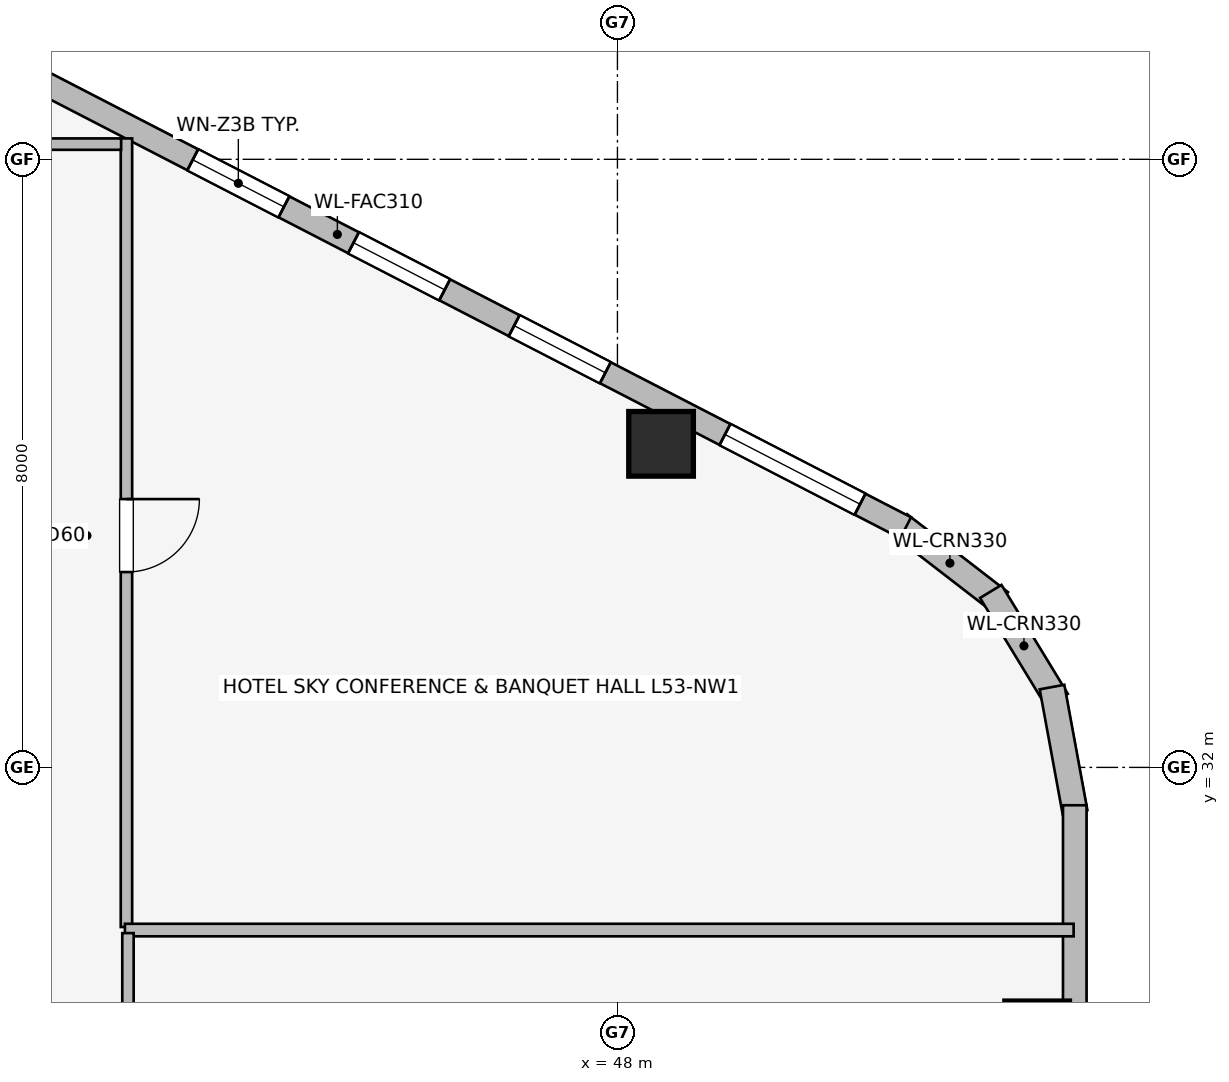
"""IFC4 building model, lengths in metres.
Left out: names, types, materials, properties, quantities, classifications, styles, units other than length and angle.
Written with IfcOpenShell. Run it as: python <this file> out.ifc"""

import sys

from ifc_helpers import new_model, si_unit, direction, frame, frame_2d, origin, origin_2d, place, context, subcontext, project, spatial, rectangle, extrude, element, fill, save


model = new_model("IFC4")
c1 = context("Model", 3, precision=1e-05, world=origin(), true_north=direction((0.0, 1.0)))
c2 = subcontext(c1, "Body", "Model", "MODEL_VIEW")
j1 = project(units=[si_unit("LENGTHUNIT", "METRE"), si_unit("PLANEANGLEUNIT", "RADIAN")], contexts=[c1])
p1 = place(None, origin())
s1 = spatial("IfcSite", under=j1, at=p1, CompositionType="ELEMENT")
p2 = place(p1, origin())
s2 = spatial("IfcBuilding", under=s1, at=p2, CompositionType="ELEMENT")
p3 = place(p2, frame((0.0, 0.0, 196.45)))
s3 = spatial("IfcBuildingStorey", under=s2, at=p3, CompositionType="ELEMENT", Elevation=196.45)
for number, where, z_axis, x_axis in (
    (1, (48.574, 36.257, 0.0), (0.0, 0.0, 1.0), (1.0, 0.0, 0.0)),
    (2, (53.522, 28.501, 0.0), (0.0, 0.0, 1.0), (1.0, 0.0, 0.0)),
):
    element("IfcColumn", number, at=place(p3, frame(where, z_axis=z_axis, x_axis=x_axis)), inside=s3, PredefinedType="COLUMN", context=c2, shape_type="SweptSolid", body=[
        extrude(rectangle(XDim=0.85, YDim=0.85, at=origin_2d()), origin(), (0.0, 0.0, 1.0), 3.45),
    ])
p4 = place(p3, frame((51.711, 35.2, 0.0), z_axis=(0.0, 0.0, 1.0), x_axis=(0.791464279355, -0.611215423976, 0.0)))
e3 = element("IfcWall", 3, at=p4, inside=s3, PredefinedType="STANDARD", context=c2, shape_type="SweptSolid", body=[
    extrude(rectangle(XDim=1.677, YDim=0.33, at=frame_2d((0.838, 0.0))), origin(), (0.0, 0.0, 1.0), 3.19),
])
p5 = place(p3, frame((52.912, 34.315, 0.0), z_axis=(0.0, 0.0, 1.0), x_axis=(0.520219286058, -0.85403272444, 0.0)))
e4 = element("IfcWall", 4, at=p5, inside=s3, PredefinedType="STANDARD", context=c2, shape_type="SweptSolid", body=[
    extrude(rectangle(XDim=1.678, YDim=0.33, at=frame_2d((0.839, 0.0))), origin(), (0.0, 0.0, 1.0), 3.19),
])
p6 = place(p3, frame((53.718, 33.057, 0.0), z_axis=(0.0, 0.0, 1.0), x_axis=(0.180717642671, -0.983535019014, 0.0)))
e5 = element("IfcWall", 5, at=p6, inside=s3, PredefinedType="STANDARD", context=c2, shape_type="SweptSolid", body=[
    extrude(rectangle(XDim=1.677, YDim=0.33, at=frame_2d((0.838, 0.0))), origin(), (0.0, 0.0, 1.0), 3.19),
])
p7 = place(p3, frame((36.838, 42.871, 0.0), z_axis=(0.0, 0.0, 1.0), x_axis=(0.888626188278, -0.458632202867, 0.0)))
e6 = element("IfcWall", 6, at=p7, inside=s3, PredefinedType="STANDARD", context=c2, shape_type="SweptSolid", body=[
    extrude(rectangle(XDim=16.828, YDim=0.31, at=frame_2d((8.414, 0.0))), origin(), (0.0, 0.0, 1.0), 3.19),
])
p8 = place(p7, frame((0.675, 0.0, 0.75)))
e7 = element("IfcOpeningElement", 7, at=p8, cuts=e6, PredefinedType="OPENING", context=c2, shape_type="SweptSolid", body=[
    extrude(rectangle(XDim=2.0, YDim=1.5, at=frame_2d((1.0, 0.75))), frame((0.0, 0.165, 0.0), z_axis=(0.0, -1.0, 0.0), x_axis=(1.0, 0.0, 0.0)), (0.0, 0.0, 1.0), 0.33),
])
p9 = place(p7, frame((6.273, 0.0, 0.75)))
e8 = element("IfcOpeningElement", 8, at=p9, cuts=e6, PredefinedType="OPENING", context=c2, shape_type="SweptSolid", body=[
    extrude(rectangle(XDim=1.35, YDim=1.45, at=frame_2d((0.675, 0.725))), frame((0.0, 0.165, 0.0), z_axis=(0.0, -1.0, 0.0), x_axis=(1.0, 0.0, 0.0)), (0.0, 0.0, 1.0), 0.33),
])
p10 = place(p7, frame((8.653, 0.0, 0.75)))
e9 = element("IfcOpeningElement", 9, at=p10, cuts=e6, PredefinedType="OPENING", context=c2, shape_type="SweptSolid", body=[
    extrude(rectangle(XDim=1.35, YDim=1.45, at=frame_2d((0.675, 0.725))), frame((0.0, 0.165, 0.0), z_axis=(0.0, -1.0, 0.0), x_axis=(1.0, 0.0, 0.0)), (0.0, 0.0, 1.0), 0.33),
])
p11 = place(p7, frame((11.032, 0.0, 0.75)))
e10 = element("IfcOpeningElement", 10, at=p11, cuts=e6, PredefinedType="OPENING", context=c2, shape_type="SweptSolid", body=[
    extrude(rectangle(XDim=1.35, YDim=1.45, at=frame_2d((0.675, 0.725))), frame((0.0, 0.165, 0.0), z_axis=(0.0, -1.0, 0.0), x_axis=(1.0, 0.0, 0.0)), (0.0, 0.0, 1.0), 0.33),
])
p12 = place(p7, frame((14.153, 0.0, 0.75)))
e11 = element("IfcOpeningElement", 11, at=p12, cuts=e6, PredefinedType="OPENING", context=c2, shape_type="SweptSolid", body=[
    extrude(rectangle(XDim=2.0, YDim=1.5, at=frame_2d((1.0, 0.75))), frame((0.0, 0.165, 0.0), z_axis=(0.0, -1.0, 0.0), x_axis=(1.0, 0.0, 0.0)), (0.0, 0.0, 1.0), 0.33),
])
p13 = place(p3, frame((54.017, 31.502, 0.0), z_axis=(0.0, 0.0, 1.0), x_axis=(0.0, -1.0, 0.0)))
e12 = element("IfcWall", 12, at=p13, inside=s3, PredefinedType="STANDARD", context=c2, shape_type="SweptSolid", body=[
    extrude(rectangle(XDim=15.004, YDim=0.31, at=frame_2d((7.502, 0.0))), origin(), (0.0, 0.0, 1.0), 3.19),
])
p14 = place(p13, frame((3.722, 0.0, 0.75)))
e13 = element("IfcOpeningElement", 13, at=p14, cuts=e12, PredefinedType="OPENING", context=c2, shape_type="SweptSolid", body=[
    extrude(rectangle(XDim=1.05, YDim=1.4, at=frame_2d((0.525, 0.7))), frame((0.0, 0.165, 0.0), z_axis=(0.0, -1.0, 0.0), x_axis=(1.0, 0.0, 0.0)), (0.0, 0.0, 1.0), 0.33),
])
p15 = place(p13, frame((6.419, 0.0, 0.75)))
e14 = element("IfcOpeningElement", 14, at=p15, cuts=e12, PredefinedType="OPENING", context=c2, shape_type="SweptSolid", body=[
    extrude(rectangle(XDim=1.35, YDim=1.45, at=frame_2d((0.675, 0.725))), frame((0.0, 0.165, 0.0), z_axis=(0.0, -1.0, 0.0), x_axis=(1.0, 0.0, 0.0)), (0.0, 0.0, 1.0), 0.33),
])
p16 = place(p13, frame((9.825, 0.0, 0.75)))
e15 = element("IfcOpeningElement", 15, at=p16, cuts=e12, PredefinedType="OPENING", context=c2, shape_type="SweptSolid", body=[
    extrude(rectangle(XDim=1.05, YDim=1.4, at=frame_2d((0.525, 0.7))), frame((0.0, 0.165, 0.0), z_axis=(0.0, -1.0, 0.0), x_axis=(1.0, 0.0, 0.0)), (0.0, 0.0, 1.0), 0.33),
])
p17 = place(p3, frame((41.54, 40.275, 0.0), z_axis=(0.0, 0.0, 1.0), x_axis=(0.0, -1.0, 0.0)))
e16 = element("IfcWall", 16, at=p17, inside=s3, PredefinedType="PARTITIONING", context=c2, shape_type="SweptSolid", body=[
    extrude(rectangle(XDim=10.375, YDim=0.15, at=frame_2d((5.188, 0.0))), origin(), (0.0, 0.0, 1.0), 3.19),
])
p18 = place(p17, frame((4.745, 0.0, 0.0)))
e17 = element("IfcOpeningElement", 17, at=p18, cuts=e16, PredefinedType="OPENING", context=c2, shape_type="SweptSolid", body=[
    extrude(rectangle(XDim=0.96, YDim=2.0, at=frame_2d((0.48, 1.0))), frame((0.0, 0.085, 0.0), z_axis=(0.0, -1.0, 0.0), x_axis=(1.0, 0.0, 0.0)), (0.0, 0.0, 1.0), 0.17),
])
p19 = place(p3, frame((41.52, 29.86, 0.0), z_axis=(0.0, 0.0, 1.0), x_axis=(1.0, 0.0, 0.0)))
e18 = element("IfcWall", 18, at=p19, inside=s3, PredefinedType="PARTITIONING", context=c2, shape_type="SweptSolid", body=[
    extrude(rectangle(XDim=12.482, YDim=0.165, at=frame_2d((6.241, 0.0))), origin(), (0.0, 0.0, 1.0), 3.19),
])
p20 = place(p3, frame((41.56, 26.23, 0.0), z_axis=(0.0, 0.0, 1.0), x_axis=(0.0, 1.0, 0.0)))
e19 = element("IfcWall", 19, at=p20, inside=s3, PredefinedType="PARTITIONING", context=c2, shape_type="SweptSolid", body=[
    extrude(rectangle(XDim=3.59, YDim=0.15, at=frame_2d((1.795, 0.0))), origin(), (0.0, 0.0, 1.0), 3.19),
])
p21 = place(p20, frame((1.315, 0.0, 0.0)))
e20 = element("IfcOpeningElement", 20, at=p21, cuts=e19, PredefinedType="OPENING", context=c2, shape_type="SweptSolid", body=[
    extrude(rectangle(XDim=0.96, YDim=2.0, at=frame_2d((0.48, 1.0))), frame((0.0, 0.085, 0.0), z_axis=(0.0, -1.0, 0.0), x_axis=(1.0, 0.0, 0.0)), (0.0, 0.0, 1.0), 0.17),
])
p22 = place(p3, frame((39.958, 40.2, 0.0), z_axis=(0.0, 0.0, 1.0), x_axis=(1.0, 0.0, 0.0)))
e21 = element("IfcWall", 21, at=p22, inside=s3, PredefinedType="PARTITIONING", context=c2, shape_type="SweptSolid", body=[
    extrude(rectangle(XDim=1.512, YDim=0.15, at=frame_2d((0.756, 0.0))), origin(), (0.0, 0.0, 1.0), 3.19),
])
p23 = place(p9, origin())
e22 = element("IfcWindow", 22, at=p23, inside=s3, PartitioningType="SINGLE_PANEL", PredefinedType="WINDOW", context=c2, shape_type="SweptSolid", body=[
    extrude(rectangle(XDim=1.35, YDim=1.45, at=frame_2d((0.675, 0.725))), frame((0.0, 0.03, 0.0), z_axis=(0.0, -1.0, 0.0), x_axis=(1.0, 0.0, 0.0)), (0.0, 0.0, 1.0), 0.06),
])
fill(e8, e22)
p24 = place(p10, origin())
e23 = element("IfcWindow", 23, at=p24, inside=s3, PartitioningType="SINGLE_PANEL", PredefinedType="WINDOW", context=c2, shape_type="SweptSolid", body=[
    extrude(rectangle(XDim=1.35, YDim=1.45, at=frame_2d((0.675, 0.725))), frame((0.0, 0.03, 0.0), z_axis=(0.0, -1.0, 0.0), x_axis=(1.0, 0.0, 0.0)), (0.0, 0.0, 1.0), 0.06),
])
fill(e9, e23)
p25 = place(p11, origin())
e24 = element("IfcWindow", 24, at=p25, inside=s3, PartitioningType="SINGLE_PANEL", PredefinedType="WINDOW", context=c2, shape_type="SweptSolid", body=[
    extrude(rectangle(XDim=1.35, YDim=1.45, at=frame_2d((0.675, 0.725))), frame((0.0, 0.03, 0.0), z_axis=(0.0, -1.0, 0.0), x_axis=(1.0, 0.0, 0.0)), (0.0, 0.0, 1.0), 0.06),
])
fill(e10, e24)
p26 = place(p12, origin())
e25 = element("IfcWindow", 25, at=p26, inside=s3, PartitioningType="SINGLE_PANEL", PredefinedType="WINDOW", context=c2, shape_type="SweptSolid", body=[
    extrude(rectangle(XDim=2.0, YDim=1.5, at=frame_2d((1.0, 0.75))), frame((0.0, 0.03, 0.0), z_axis=(0.0, -1.0, 0.0), x_axis=(1.0, 0.0, 0.0)), (0.0, 0.0, 1.0), 0.06),
])
fill(e11, e25)
p27 = place(p18, origin())
e26 = element("IfcDoor", 26, at=p27, inside=s3, OperationType="SINGLE_SWING_LEFT", PredefinedType="DOOR", context=c2, shape_type="SweptSolid", body=[
    extrude(rectangle(XDim=0.96, YDim=2.0, at=frame_2d((0.48, 1.0))), frame((0.0, 0.025, 0.0), z_axis=(0.0, -1.0, 0.0), x_axis=(1.0, 0.0, 0.0)), (0.0, 0.0, 1.0), 0.05),
])
fill(e17, e26)
save(model, sys.argv[1])
